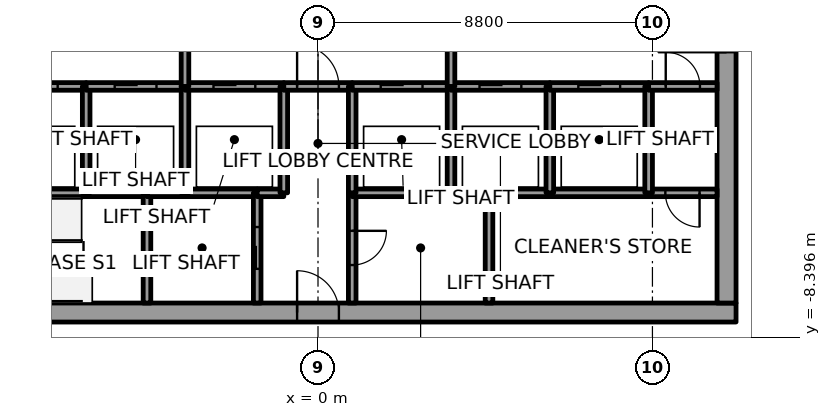
"""IFC4 building model, lengths in metres.
Left out: names, types, materials, properties, quantities, classifications, styles, units other than length and angle.
Written with IfcOpenShell. Run it as: python <this file> out.ifc"""

import sys

from ifc_helpers import new_model, si_unit, direction, frame, frame_2d, origin, place, context, subcontext, project, spatial, rectangle, extrude, element, fill, save


model = new_model("IFC4")
c1 = context("Model", 3, precision=1e-05, world=origin(), true_north=direction((0.0, 1.0)))
c2 = subcontext(c1, "Body", "Model", "MODEL_VIEW")
j1 = project(units=[si_unit("LENGTHUNIT", "METRE"), si_unit("PLANEANGLEUNIT", "RADIAN")], contexts=[c1])
p1 = place(None, origin())
s1 = spatial("IfcSite", under=j1, at=p1, CompositionType="ELEMENT")
p2 = place(p1, origin())
s2 = spatial("IfcBuilding", under=s1, at=p2, CompositionType="ELEMENT")
p3 = place(p2, frame((0.0, 0.0, 209.8)))
s3 = spatial("IfcBuildingStorey", under=s2, at=p3, CompositionType="ELEMENT", Elevation=209.8)
p4 = place(p3, frame((-11.0, -7.75, 0.0), z_axis=(0.0, 0.0, 1.0), x_axis=(1.0, 0.0, 0.0)))
e1 = element("IfcWall", 1, at=p4, inside=s3, PredefinedType="SHEAR", context=c2, shape_type="SweptSolid", body=[
    extrude(rectangle(XDim=22.0, YDim=0.5, at=frame_2d((11.0, 0.0))), origin(), (0.0, 0.0, 1.0), 4.0),
])
p5 = place(p4, frame((10.45, 0.0, 0.0)))
e2 = element("IfcOpeningElement", 2, at=p5, cuts=e1, PredefinedType="OPENING", context=c2, shape_type="SweptSolid", body=[
    extrude(rectangle(XDim=1.1, YDim=2.1, at=frame_2d((0.55, 1.05))), frame((0.0, 0.25, 0.0), z_axis=(0.0, -1.0, 0.0), x_axis=(1.0, 0.0, 0.0)), (0.0, 0.0, 1.0), 0.5),
])
p6 = place(p3, frame((10.75, -7.5, 0.0), z_axis=(0.0, 0.0, 1.0), x_axis=(0.0, 1.0, 0.0)))
e3 = element("IfcWall", 3, at=p6, inside=s3, PredefinedType="SHEAR", context=c2, shape_type="SweptSolid", body=[
    extrude(rectangle(XDim=15.0, YDim=0.5, at=frame_2d((7.5, 0.0))), origin(), (0.0, 0.0, 1.0), 4.0),
])
p7 = place(p6, frame((6.6, 0.0, 0.0)))
e4 = element("IfcOpeningElement", 4, at=p7, cuts=e3, PredefinedType="OPENING", context=c2, shape_type="SweptSolid", body=[
    extrude(rectangle(XDim=1.8, YDim=2.1, at=frame_2d((0.9, 1.05))), frame((0.0, 0.25, 0.0), z_axis=(0.0, -1.0, 0.0), x_axis=(1.0, 0.0, 0.0)), (0.0, 0.0, 1.0), 0.5),
])
p8 = place(p3, frame((-8.7, -4.6, 0.0), z_axis=(0.0, 0.0, 1.0), x_axis=(1.0, 0.0, 0.0)))
e5 = element("IfcWall", 5, at=p8, inside=s3, PredefinedType="SOLIDWALL", context=c2, shape_type="SweptSolid", body=[
    extrude(rectangle(XDim=2.6, YDim=0.2, at=frame_2d((1.3, 0.0))), origin(), (0.0, 0.0, 1.0), 3.85),
])
p9 = place(p3, frame((-8.7, -1.8, 0.0), z_axis=(0.0, 0.0, 1.0), x_axis=(1.0, 0.0, 0.0)))
e6 = element("IfcWall", 6, at=p9, inside=s3, PredefinedType="SOLIDWALL", context=c2, shape_type="SweptSolid", body=[
    extrude(rectangle(XDim=2.6, YDim=0.2, at=frame_2d((1.3, 0.0))), origin(), (0.0, 0.0, 1.0), 3.85),
])
p10 = place(p9, frame((0.75, 0.0, 0.0)))
e7 = element("IfcOpeningElement", 7, at=p10, cuts=e6, PredefinedType="OPENING", context=c2, shape_type="SweptSolid", body=[
    extrude(rectangle(XDim=1.1, YDim=2.1, at=frame_2d((0.55, 1.05))), frame((0.0, 0.1, 0.0), z_axis=(0.0, -1.0, 0.0), x_axis=(1.0, 0.0, 0.0)), (0.0, 0.0, 1.0), 0.2),
])
p11 = place(p3, frame((-6.1, -4.6, 0.0), z_axis=(0.0, 0.0, 1.0), x_axis=(1.0, 0.0, 0.0)))
e8 = element("IfcWall", 8, at=p11, inside=s3, PredefinedType="SOLIDWALL", context=c2, shape_type="SweptSolid", body=[
    extrude(rectangle(XDim=1.6, YDim=0.2, at=frame_2d((0.8, 0.0))), origin(), (0.0, 0.0, 1.0), 3.85),
])
p12 = place(p3, frame((-6.1, -4.6, 0.0), z_axis=(0.0, 0.0, 1.0), x_axis=(0.0, 1.0, 0.0)))
e9 = element("IfcWall", 9, at=p12, inside=s3, PredefinedType="SOLIDWALL", context=c2, shape_type="SweptSolid", body=[
    extrude(rectangle(XDim=2.8, YDim=0.2, at=frame_2d((1.4, 0.0))), origin(), (0.0, 0.0, 1.0), 3.85),
])
p13 = place(p3, frame((-6.1, -1.8, 0.0), z_axis=(0.0, 0.0, 1.0), x_axis=(1.0, 0.0, 0.0)))
e10 = element("IfcWall", 10, at=p13, inside=s3, PredefinedType="SOLIDWALL", context=c2, shape_type="SweptSolid", body=[
    extrude(rectangle(XDim=2.6, YDim=0.2, at=frame_2d((1.3, 0.0))), origin(), (0.0, 0.0, 1.0), 3.85),
])
p14 = place(p13, frame((0.75, 0.0, 0.0)))
e11 = element("IfcOpeningElement", 11, at=p14, cuts=e10, PredefinedType="OPENING", context=c2, shape_type="SweptSolid", body=[
    extrude(rectangle(XDim=1.1, YDim=2.1, at=frame_2d((0.55, 1.05))), frame((0.0, 0.1, 0.0), z_axis=(0.0, -1.0, 0.0), x_axis=(1.0, 0.0, 0.0)), (0.0, 0.0, 1.0), 0.2),
])
p15 = place(p3, frame((-4.5, -4.6, 0.0), z_axis=(0.0, 0.0, 1.0), x_axis=(0.0, -1.0, 0.0)))
e12 = element("IfcWall", 12, at=p15, inside=s3, PredefinedType="SOLIDWALL", context=c2, shape_type="SweptSolid", body=[
    extrude(rectangle(XDim=2.9, YDim=0.2, at=frame_2d((1.45, 0.0))), origin(), (0.0, 0.0, 1.0), 3.85),
])
p16 = place(p3, frame((-4.5, -4.6, 0.0), z_axis=(0.0, 0.0, 1.0), x_axis=(1.0, 0.0, 0.0)))
e13 = element("IfcWall", 13, at=p16, inside=s3, PredefinedType="SOLIDWALL", context=c2, shape_type="SweptSolid", body=[
    extrude(rectangle(XDim=1.0, YDim=0.2, at=frame_2d((0.5, 0.0))), origin(), (0.0, 0.0, 1.0), 3.85),
])
p17 = place(p3, frame((-3.5, -4.6, 0.0), z_axis=(0.0, 0.0, 1.0), x_axis=(1.0, 0.0, 0.0)))
e14 = element("IfcWall", 14, at=p17, inside=s3, PredefinedType="SOLIDWALL", context=c2, shape_type="SweptSolid", body=[
    extrude(rectangle(XDim=1.9, YDim=0.2, at=frame_2d((0.95, 0.0))), origin(), (0.0, 0.0, 1.0), 3.85),
])
p18 = place(p3, frame((-3.5, -4.6, 0.0), z_axis=(0.0, 0.0, 1.0), x_axis=(0.0, 1.0, 0.0)))
e15 = element("IfcWall", 15, at=p18, inside=s3, PredefinedType="SOLIDWALL", context=c2, shape_type="SweptSolid", body=[
    extrude(rectangle(XDim=2.8, YDim=0.2, at=frame_2d((1.4, 0.0))), origin(), (0.0, 0.0, 1.0), 3.85),
])
p19 = place(p3, frame((-3.5, -1.8, 0.0), z_axis=(0.0, 0.0, 1.0), x_axis=(1.0, 0.0, 0.0)))
e16 = element("IfcWall", 16, at=p19, inside=s3, PredefinedType="SOLIDWALL", context=c2, shape_type="SweptSolid", body=[
    extrude(rectangle(XDim=2.6, YDim=0.2, at=frame_2d((1.3, 0.0))), origin(), (0.0, 0.0, 1.0), 3.85),
])
p20 = place(p19, frame((0.75, 0.0, 0.0)))
e17 = element("IfcOpeningElement", 17, at=p20, cuts=e16, PredefinedType="OPENING", context=c2, shape_type="SweptSolid", body=[
    extrude(rectangle(XDim=1.1, YDim=2.1, at=frame_2d((0.55, 1.05))), frame((0.0, 0.1, 0.0), z_axis=(0.0, -1.0, 0.0), x_axis=(1.0, 0.0, 0.0)), (0.0, 0.0, 1.0), 0.2),
])
p21 = place(p3, frame((-3.5, 1.8, 0.0), z_axis=(0.0, 0.0, 1.0), x_axis=(0.0, -1.0, 0.0)))
e18 = element("IfcWall", 18, at=p21, inside=s3, PredefinedType="SOLIDWALL", context=c2, shape_type="SweptSolid", body=[
    extrude(rectangle(XDim=3.6, YDim=0.2, at=frame_2d((1.8, 0.0))), origin(), (0.0, 0.0, 1.0), 3.85),
])
p22 = place(p21, frame((1.05, 0.0, 0.0)))
e19 = element("IfcOpeningElement", 19, at=p22, cuts=e18, PredefinedType="OPENING", context=c2, shape_type="SweptSolid", body=[
    extrude(rectangle(XDim=1.5, YDim=2.1, at=frame_2d((0.75, 1.05))), frame((0.0, 0.1, 0.0), z_axis=(0.0, -1.0, 0.0), x_axis=(1.0, 0.0, 0.0)), (0.0, 0.0, 1.0), 0.2),
])
p23 = place(p3, frame((-1.6, -7.5, 0.0), z_axis=(0.0, 0.0, 1.0), x_axis=(0.0, 1.0, 0.0)))
e20 = element("IfcWall", 20, at=p23, inside=s3, PredefinedType="SOLIDWALL", context=c2, shape_type="SweptSolid", body=[
    extrude(rectangle(XDim=2.9, YDim=0.2, at=frame_2d((1.45, 0.0))), origin(), (0.0, 0.0, 1.0), 3.85),
])
p24 = place(p23, frame((0.9, 0.0, 0.0)))
e21 = element("IfcOpeningElement", 21, at=p24, cuts=e20, PredefinedType="OPENING", context=c2, shape_type="SweptSolid", body=[
    extrude(rectangle(XDim=1.1, YDim=2.1, at=frame_2d((0.55, 1.05))), frame((0.0, 0.1, 0.0), z_axis=(0.0, -1.0, 0.0), x_axis=(1.0, 0.0, 0.0)), (0.0, 0.0, 1.0), 0.2),
])
p25 = place(p3, frame((-1.6, -4.6, 0.0), z_axis=(0.0, 0.0, 1.0), x_axis=(1.0, 0.0, 0.0)))
e22 = element("IfcWall", 22, at=p25, inside=s3, PredefinedType="SOLIDWALL", context=c2, shape_type="SweptSolid", body=[
    extrude(rectangle(XDim=0.7, YDim=0.2, at=frame_2d((0.35, 0.0))), origin(), (0.0, 0.0, 1.0), 3.85),
])
p26 = place(p3, frame((-0.9, -4.6, 0.0), z_axis=(0.0, 0.0, 1.0), x_axis=(0.0, 1.0, 0.0)))
e23 = element("IfcWall", 23, at=p26, inside=s3, PredefinedType="SOLIDWALL", context=c2, shape_type="SweptSolid", body=[
    extrude(rectangle(XDim=2.8, YDim=0.2, at=frame_2d((1.4, 0.0))), origin(), (0.0, 0.0, 1.0), 3.85),
])
p27 = place(p3, frame((-0.9, -1.8, 0.0), z_axis=(0.0, 0.0, 1.0), x_axis=(1.0, 0.0, 0.0)))
e24 = element("IfcWall", 24, at=p27, inside=s3, PredefinedType="SOLIDWALL", context=c2, shape_type="SweptSolid", body=[
    extrude(rectangle(XDim=1.8, YDim=0.2, at=frame_2d((0.9, 0.0))), origin(), (0.0, 0.0, 1.0), 3.85),
])
p28 = place(p27, frame((0.35, 0.0, 0.0)))
e25 = element("IfcOpeningElement", 25, at=p28, cuts=e24, PredefinedType="OPENING", context=c2, shape_type="SweptSolid", body=[
    extrude(rectangle(XDim=1.1, YDim=2.1, at=frame_2d((0.55, 1.05))), frame((0.0, 0.1, 0.0), z_axis=(0.0, -1.0, 0.0), x_axis=(1.0, 0.0, 0.0)), (0.0, 0.0, 1.0), 0.2),
])
p29 = place(p3, frame((0.9, -4.6, 0.0), z_axis=(0.0, 0.0, 1.0), x_axis=(0.0, -1.0, 0.0)))
e26 = element("IfcWall", 26, at=p29, inside=s3, PredefinedType="SOLIDWALL", context=c2, shape_type="SweptSolid", body=[
    extrude(rectangle(XDim=2.9, YDim=0.2, at=frame_2d((1.45, 0.0))), origin(), (0.0, 0.0, 1.0), 3.85),
])
p30 = place(p29, frame((1.0, 0.0, 0.0)))
e27 = element("IfcOpeningElement", 27, at=p30, cuts=e26, PredefinedType="OPENING", context=c2, shape_type="SweptSolid", body=[
    extrude(rectangle(XDim=0.9, YDim=2.1, at=frame_2d((0.45, 1.05))), frame((0.0, 0.1, 0.0), z_axis=(0.0, -1.0, 0.0), x_axis=(1.0, 0.0, 0.0)), (0.0, 0.0, 1.0), 0.2),
])
p31 = place(p3, frame((3.5, -4.6, 0.0), z_axis=(0.0, 0.0, 1.0), x_axis=(-1.0, 0.0, 0.0)))
e28 = element("IfcWall", 28, at=p31, inside=s3, PredefinedType="SOLIDWALL", context=c2, shape_type="SweptSolid", body=[
    extrude(rectangle(XDim=2.6, YDim=0.2, at=frame_2d((1.3, 0.0))), origin(), (0.0, 0.0, 1.0), 3.85),
])
p32 = place(p3, frame((0.9, -1.8, 0.0), z_axis=(0.0, 0.0, 1.0), x_axis=(0.0, -1.0, 0.0)))
e29 = element("IfcWall", 29, at=p32, inside=s3, PredefinedType="SOLIDWALL", context=c2, shape_type="SweptSolid", body=[
    extrude(rectangle(XDim=2.8, YDim=0.2, at=frame_2d((1.4, 0.0))), origin(), (0.0, 0.0, 1.0), 3.85),
])
p33 = place(p3, frame((0.9, -1.8, 0.0), z_axis=(0.0, 0.0, 1.0), x_axis=(1.0, 0.0, 0.0)))
e30 = element("IfcWall", 30, at=p33, inside=s3, PredefinedType="SOLIDWALL", context=c2, shape_type="SweptSolid", body=[
    extrude(rectangle(XDim=2.6, YDim=0.2, at=frame_2d((1.3, 0.0))), origin(), (0.0, 0.0, 1.0), 3.85),
])
p34 = place(p33, frame((0.75, 0.0, 0.0)))
e31 = element("IfcOpeningElement", 31, at=p34, cuts=e30, PredefinedType="OPENING", context=c2, shape_type="SweptSolid", body=[
    extrude(rectangle(XDim=1.1, YDim=2.1, at=frame_2d((0.55, 1.05))), frame((0.0, 0.1, 0.0), z_axis=(0.0, -1.0, 0.0), x_axis=(1.0, 0.0, 0.0)), (0.0, 0.0, 1.0), 0.2),
])
p35 = place(p3, frame((4.5, -4.6, 0.0), z_axis=(0.0, 0.0, 1.0), x_axis=(-1.0, 0.0, 0.0)))
e32 = element("IfcWall", 32, at=p35, inside=s3, PredefinedType="SOLIDWALL", context=c2, shape_type="SweptSolid", body=[
    extrude(rectangle(XDim=1.0, YDim=0.2, at=frame_2d((0.5, 0.0))), origin(), (0.0, 0.0, 1.0), 3.85),
])
p36 = place(p3, frame((3.5, -4.6, 0.0), z_axis=(0.0, 0.0, 1.0), x_axis=(0.0, 1.0, 0.0)))
e33 = element("IfcWall", 33, at=p36, inside=s3, PredefinedType="SOLIDWALL", context=c2, shape_type="SweptSolid", body=[
    extrude(rectangle(XDim=2.8, YDim=0.2, at=frame_2d((1.4, 0.0))), origin(), (0.0, 0.0, 1.0), 3.85),
])
p37 = place(p3, frame((3.5, -1.8, 0.0), z_axis=(0.0, 0.0, 1.0), x_axis=(1.0, 0.0, 0.0)))
e34 = element("IfcWall", 34, at=p37, inside=s3, PredefinedType="SOLIDWALL", context=c2, shape_type="SweptSolid", body=[
    extrude(rectangle(XDim=2.6, YDim=0.2, at=frame_2d((1.3, 0.0))), origin(), (0.0, 0.0, 1.0), 3.85),
])
p38 = place(p37, frame((0.75, 0.0, 0.0)))
e35 = element("IfcOpeningElement", 35, at=p38, cuts=e34, PredefinedType="OPENING", context=c2, shape_type="SweptSolid", body=[
    extrude(rectangle(XDim=1.1, YDim=2.1, at=frame_2d((0.55, 1.05))), frame((0.0, 0.1, 0.0), z_axis=(0.0, -1.0, 0.0), x_axis=(1.0, 0.0, 0.0)), (0.0, 0.0, 1.0), 0.2),
])
p39 = place(p3, frame((3.5, -1.8, 0.0), z_axis=(0.0, 0.0, 1.0), x_axis=(0.0, 1.0, 0.0)))
e36 = element("IfcWall", 36, at=p39, inside=s3, PredefinedType="SOLIDWALL", context=c2, shape_type="SweptSolid", body=[
    extrude(rectangle(XDim=3.6, YDim=0.2, at=frame_2d((1.8, 0.0))), origin(), (0.0, 0.0, 1.0), 3.85),
])
p40 = place(p39, frame((1.05, 0.0, 0.0)))
e37 = element("IfcOpeningElement", 37, at=p40, cuts=e36, PredefinedType="OPENING", context=c2, shape_type="SweptSolid", body=[
    extrude(rectangle(XDim=1.5, YDim=2.1, at=frame_2d((0.75, 1.05))), frame((0.0, 0.1, 0.0), z_axis=(0.0, -1.0, 0.0), x_axis=(1.0, 0.0, 0.0)), (0.0, 0.0, 1.0), 0.2),
])
p41 = place(p3, frame((4.5, -4.6, 0.0), z_axis=(0.0, 0.0, 1.0), x_axis=(0.0, -1.0, 0.0)))
e38 = element("IfcWall", 38, at=p41, inside=s3, PredefinedType="SOLIDWALL", context=c2, shape_type="SweptSolid", body=[
    extrude(rectangle(XDim=2.9, YDim=0.2, at=frame_2d((1.45, 0.0))), origin(), (0.0, 0.0, 1.0), 3.85),
])
p42 = place(p3, frame((6.1, -4.6, 0.0), z_axis=(0.0, 0.0, 1.0), x_axis=(-1.0, 0.0, 0.0)))
e39 = element("IfcWall", 39, at=p42, inside=s3, PredefinedType="SOLIDWALL", context=c2, shape_type="SweptSolid", body=[
    extrude(rectangle(XDim=1.6, YDim=0.2, at=frame_2d((0.8, 0.0))), origin(), (0.0, 0.0, 1.0), 3.85),
])
p43 = place(p3, frame((8.7, -4.6, 0.0), z_axis=(0.0, 0.0, 1.0), x_axis=(-1.0, 0.0, 0.0)))
e40 = element("IfcWall", 40, at=p43, inside=s3, PredefinedType="SOLIDWALL", context=c2, shape_type="SweptSolid", body=[
    extrude(rectangle(XDim=2.6, YDim=0.2, at=frame_2d((1.3, 0.0))), origin(), (0.0, 0.0, 1.0), 3.85),
])
p44 = place(p3, frame((6.1, -4.6, 0.0), z_axis=(0.0, 0.0, 1.0), x_axis=(0.0, 1.0, 0.0)))
e41 = element("IfcWall", 41, at=p44, inside=s3, PredefinedType="SOLIDWALL", context=c2, shape_type="SweptSolid", body=[
    extrude(rectangle(XDim=2.8, YDim=0.2, at=frame_2d((1.4, 0.0))), origin(), (0.0, 0.0, 1.0), 3.85),
])
p45 = place(p3, frame((6.1, -1.8, 0.0), z_axis=(0.0, 0.0, 1.0), x_axis=(1.0, 0.0, 0.0)))
e42 = element("IfcWall", 42, at=p45, inside=s3, PredefinedType="SOLIDWALL", context=c2, shape_type="SweptSolid", body=[
    extrude(rectangle(XDim=2.6, YDim=0.2, at=frame_2d((1.3, 0.0))), origin(), (0.0, 0.0, 1.0), 3.85),
])
p46 = place(p45, frame((0.75, 0.0, 0.0)))
e43 = element("IfcOpeningElement", 43, at=p46, cuts=e42, PredefinedType="OPENING", context=c2, shape_type="SweptSolid", body=[
    extrude(rectangle(XDim=1.1, YDim=2.1, at=frame_2d((0.55, 1.05))), frame((0.0, 0.1, 0.0), z_axis=(0.0, -1.0, 0.0), x_axis=(1.0, 0.0, 0.0)), (0.0, 0.0, 1.0), 0.2),
])
p47 = place(p3, frame((10.5, -4.6, 0.0), z_axis=(0.0, 0.0, 1.0), x_axis=(-1.0, 0.0, 0.0)))
e44 = element("IfcWall", 44, at=p47, inside=s3, PredefinedType="SOLIDWALL", context=c2, shape_type="SweptSolid", body=[
    extrude(rectangle(XDim=1.8, YDim=0.2, at=frame_2d((0.9, 0.0))), origin(), (0.0, 0.0, 1.0), 3.85),
])
p48 = place(p47, frame((0.46, 0.0, 0.0)))
e45 = element("IfcOpeningElement", 45, at=p48, cuts=e44, PredefinedType="OPENING", context=c2, shape_type="SweptSolid", body=[
    extrude(rectangle(XDim=0.9, YDim=2.1, at=frame_2d((0.45, 1.05))), frame((0.0, 0.1, 0.0), z_axis=(0.0, -1.0, 0.0), x_axis=(1.0, 0.0, 0.0)), (0.0, 0.0, 1.0), 0.2),
])
p49 = place(p3, frame((8.7, -1.8, 0.0), z_axis=(0.0, 0.0, 1.0), x_axis=(0.0, -1.0, 0.0)))
e46 = element("IfcWall", 46, at=p49, inside=s3, PredefinedType="SOLIDWALL", context=c2, shape_type="SweptSolid", body=[
    extrude(rectangle(XDim=2.8, YDim=0.2, at=frame_2d((1.4, 0.0))), origin(), (0.0, 0.0, 1.0), 3.85),
])
p50 = place(p3, frame((8.7, -1.8, 0.0), z_axis=(0.0, 0.0, 1.0), x_axis=(1.0, 0.0, 0.0)))
e47 = element("IfcWall", 47, at=p50, inside=s3, PredefinedType="SOLIDWALL", context=c2, shape_type="SweptSolid", body=[
    extrude(rectangle(XDim=1.8, YDim=0.2, at=frame_2d((0.9, 0.0))), origin(), (0.0, 0.0, 1.0), 3.85),
])
p51 = place(p50, frame((0.45, 0.0, 0.0)))
e48 = element("IfcOpeningElement", 48, at=p51, cuts=e47, PredefinedType="OPENING", context=c2, shape_type="SweptSolid", body=[
    extrude(rectangle(XDim=0.9, YDim=2.1, at=frame_2d((0.45, 1.05))), frame((0.0, 0.1, 0.0), z_axis=(0.0, -1.0, 0.0), x_axis=(1.0, 0.0, 0.0)), (0.0, 0.0, 1.0), 0.2),
])
p52 = place(p10, origin())
e49 = element("IfcDoor", 49, at=p52, inside=s3, OperationType="SLIDING_TO_RIGHT", PredefinedType="DOOR", context=c2, shape_type="SweptSolid", body=[
    extrude(rectangle(XDim=1.1, YDim=2.1, at=frame_2d((0.55, 1.05))), frame((0.0, 0.025, 0.0), z_axis=(0.0, -1.0, 0.0), x_axis=(1.0, 0.0, 0.0)), (0.0, 0.0, 1.0), 0.05),
])
fill(e7, e49)
p53 = place(p14, origin())
e50 = element("IfcDoor", 50, at=p53, inside=s3, OperationType="SLIDING_TO_RIGHT", PredefinedType="DOOR", context=c2, shape_type="SweptSolid", body=[
    extrude(rectangle(XDim=1.1, YDim=2.1, at=frame_2d((0.55, 1.05))), frame((0.0, 0.025, 0.0), z_axis=(0.0, -1.0, 0.0), x_axis=(1.0, 0.0, 0.0)), (0.0, 0.0, 1.0), 0.05),
])
fill(e11, e50)
p54 = place(p20, origin())
e51 = element("IfcDoor", 51, at=p54, inside=s3, OperationType="SLIDING_TO_LEFT", PredefinedType="DOOR", context=c2, shape_type="SweptSolid", body=[
    extrude(rectangle(XDim=1.1, YDim=2.1, at=frame_2d((0.55, 1.05))), frame((0.0, 0.025, 0.0), z_axis=(0.0, -1.0, 0.0), x_axis=(1.0, 0.0, 0.0)), (0.0, 0.0, 1.0), 0.05),
])
fill(e17, e51)
p55 = place(p34, origin())
e52 = element("IfcDoor", 52, at=p55, inside=s3, OperationType="SLIDING_TO_LEFT", PredefinedType="DOOR", context=c2, shape_type="SweptSolid", body=[
    extrude(rectangle(XDim=1.1, YDim=2.1, at=frame_2d((0.55, 1.05))), frame((0.0, 0.025, 0.0), z_axis=(0.0, -1.0, 0.0), x_axis=(1.0, 0.0, 0.0)), (0.0, 0.0, 1.0), 0.05),
])
fill(e31, e52)
p56 = place(p38, origin())
e53 = element("IfcDoor", 53, at=p56, inside=s3, OperationType="SLIDING_TO_RIGHT", PredefinedType="DOOR", context=c2, shape_type="SweptSolid", body=[
    extrude(rectangle(XDim=1.1, YDim=2.1, at=frame_2d((0.55, 1.05))), frame((0.0, 0.025, 0.0), z_axis=(0.0, -1.0, 0.0), x_axis=(1.0, 0.0, 0.0)), (0.0, 0.0, 1.0), 0.05),
])
fill(e35, e53)
p57 = place(p46, origin())
e54 = element("IfcDoor", 54, at=p57, inside=s3, OperationType="SLIDING_TO_LEFT", PredefinedType="DOOR", context=c2, shape_type="SweptSolid", body=[
    extrude(rectangle(XDim=1.1, YDim=2.1, at=frame_2d((0.55, 1.05))), frame((0.0, 0.025, 0.0), z_axis=(0.0, -1.0, 0.0), x_axis=(1.0, 0.0, 0.0)), (0.0, 0.0, 1.0), 0.05),
])
fill(e43, e54)
p58 = place(p24, origin())
e55 = element("IfcDoor", 55, at=p58, inside=s3, OperationType="SLIDING_TO_LEFT", PredefinedType="DOOR", context=c2, shape_type="SweptSolid", body=[
    extrude(rectangle(XDim=1.1, YDim=2.1, at=frame_2d((0.55, 1.05))), frame((0.0, 0.025, 0.0), z_axis=(0.0, -1.0, 0.0), x_axis=(1.0, 0.0, 0.0)), (0.0, 0.0, 1.0), 0.05),
])
fill(e21, e55)
p59 = place(p28, origin())
e56 = element("IfcDoor", 56, at=p59, inside=s3, OperationType="SINGLE_SWING_RIGHT", PredefinedType="DOOR", context=c2, shape_type="SweptSolid", body=[
    extrude(rectangle(XDim=1.1, YDim=2.1, at=frame_2d((0.55, 1.05))), frame((0.0, 0.025, 0.0), z_axis=(0.0, -1.0, 0.0), x_axis=(1.0, 0.0, 0.0)), (0.0, 0.0, 1.0), 0.05),
])
fill(e25, e56)
p60 = place(p48, origin())
e57 = element("IfcDoor", 57, at=p60, inside=s3, OperationType="SINGLE_SWING_LEFT", PredefinedType="DOOR", context=c2, shape_type="SweptSolid", body=[
    extrude(rectangle(XDim=0.9, YDim=2.1, at=frame_2d((0.45, 1.05))), frame((0.0, 0.025, 0.0), z_axis=(0.0, -1.0, 0.0), x_axis=(1.0, 0.0, 0.0)), (0.0, 0.0, 1.0), 0.05),
])
fill(e45, e57)
p61 = place(p51, origin())
e58 = element("IfcDoor", 58, at=p61, inside=s3, OperationType="SINGLE_SWING_RIGHT", PredefinedType="DOOR", context=c2, shape_type="SweptSolid", body=[
    extrude(rectangle(XDim=0.9, YDim=2.1, at=frame_2d((0.45, 1.05))), frame((0.0, 0.025, 0.0), z_axis=(0.0, -1.0, 0.0), x_axis=(1.0, 0.0, 0.0)), (0.0, 0.0, 1.0), 0.05),
])
fill(e48, e58)
p62 = place(p30, origin())
e59 = element("IfcDoor", 59, at=p62, inside=s3, OperationType="SINGLE_SWING_LEFT", PredefinedType="DOOR", context=c2, shape_type="SweptSolid", body=[
    extrude(rectangle(XDim=0.9, YDim=2.1, at=frame_2d((0.45, 1.05))), frame((0.0, 0.025, 0.0), z_axis=(0.0, -1.0, 0.0), x_axis=(1.0, 0.0, 0.0)), (0.0, 0.0, 1.0), 0.05),
])
fill(e27, e59)
p63 = place(p7, origin())
e60 = element("IfcDoor", 60, at=p63, inside=s3, OperationType="DOUBLE_DOOR_SINGLE_SWING", PredefinedType="DOOR", context=c2, shape_type="SweptSolid", body=[
    extrude(rectangle(XDim=1.8, YDim=2.1, at=frame_2d((0.9, 1.05))), frame((0.0, 0.025, 0.0), z_axis=(0.0, -1.0, 0.0), x_axis=(1.0, 0.0, 0.0)), (0.0, 0.0, 1.0), 0.05),
])
fill(e4, e60)
p64 = place(p5, origin())
e61 = element("IfcDoor", 61, at=p64, inside=s3, OperationType="SINGLE_SWING_LEFT", PredefinedType="DOOR", context=c2, shape_type="SweptSolid", body=[
    extrude(rectangle(XDim=1.1, YDim=2.1, at=frame_2d((0.55, 1.05))), frame((0.0, 0.025, 0.0), z_axis=(0.0, -1.0, 0.0), x_axis=(1.0, 0.0, 0.0)), (0.0, 0.0, 1.0), 0.05),
])
fill(e2, e61)
save(model, sys.argv[1])
